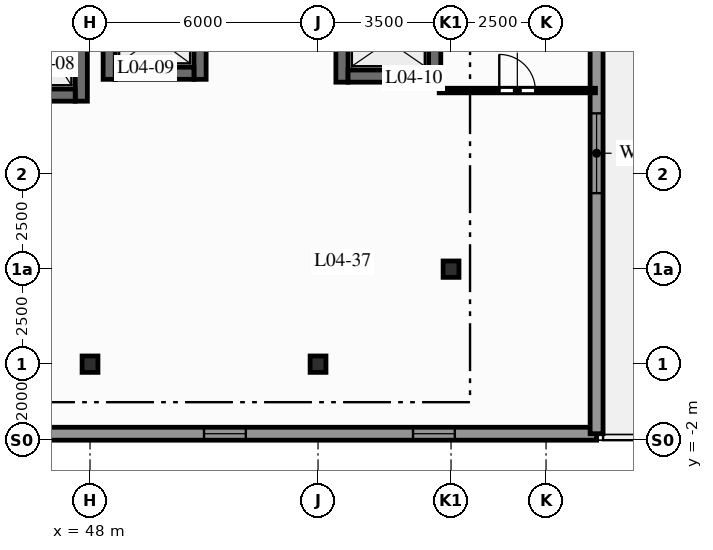
"""IFC4 building model, lengths in metres.
Left out: names, types, materials, properties, quantities, classifications, styles, units other than length and angle.
Written with IfcOpenShell. Run it as: python <this file> out.ifc"""

import sys

from ifc_helpers import new_model, si_unit, direction, frame, frame_2d, origin, origin_2d, place, context, subcontext, project, spatial, rectangle, i_section, extrude, element, fill, save


model = new_model("IFC4")
c1 = context("Model", 3, precision=1e-05, world=origin(), true_north=direction((0.0, 1.0)))
c2 = subcontext(c1, "Body", "Model", "MODEL_VIEW")
j1 = project(units=[si_unit("LENGTHUNIT", "METRE"), si_unit("PLANEANGLEUNIT", "RADIAN")], contexts=[c1])
p1 = place(None, origin())
s1 = spatial("IfcSite", under=j1, at=p1, CompositionType="ELEMENT")
p2 = place(p1, origin())
s2 = spatial("IfcBuilding", under=s1, at=p2, CompositionType="ELEMENT")
p3 = place(p2, frame((0.0, 0.0, 18.0)))
s3 = spatial("IfcBuildingStorey", under=s2, at=p3, CompositionType="ELEMENT", Elevation=18.0)
for number, where, z_axis, x_axis in (
    (1, (48.0, 0.0, 0.0), (0.0, 0.0, 1.0), (1.0, 0.0, 0.0)),
    (2, (54.0, 0.0, 0.0), (0.0, 0.0, 1.0), (1.0, 0.0, 0.0)),
    (3, (57.5, 2.5, 0.0), (0.0, 0.0, 1.0), (1.0, 0.0, 0.0)),
):
    element("IfcColumn", number, at=place(p3, frame(where, z_axis=z_axis, x_axis=x_axis)), inside=s3, PredefinedType="COLUMN", context=c2, shape_type="SweptSolid", body=[
        extrude(i_section(OverallWidth=0.417, OverallDepth=0.431, WebThickness=0.065, FlangeThickness=0.106, FilletRadius=0.015, at=origin_2d()), origin(), (0.0, 0.0, 1.0), 4.5),
    ])
p4 = place(p3, frame((-1.33, -1.83, 0.0), z_axis=(0.0, 0.0, 1.0), x_axis=(1.0, 0.0, 0.0)))
e4 = element("IfcWall", 4, at=p4, inside=s3, PredefinedType="STANDARD", context=c2, shape_type="SweptSolid", body=[
    extrude(rectangle(XDim=62.66, YDim=0.34, at=frame_2d((31.33, 0.0))), origin(), (0.0, 0.0, 1.0), 4.22),
])
p5 = place(p4, frame((2.83, 0.0, 1.2)))
e5 = element("IfcOpeningElement", 5, at=p5, cuts=e4, PredefinedType="OPENING", context=c2, shape_type="SweptSolid", body=[
    extrude(rectangle(XDim=1.1, YDim=1.1, at=frame_2d((0.55, 0.55))), frame((0.0, 0.18, 0.0), z_axis=(0.0, -1.0, 0.0), x_axis=(1.0, 0.0, 0.0)), (0.0, 0.0, 1.0), 0.36),
])
p6 = place(p4, frame((8.33, 0.0, 1.2)))
e6 = element("IfcOpeningElement", 6, at=p6, cuts=e4, PredefinedType="OPENING", context=c2, shape_type="SweptSolid", body=[
    extrude(rectangle(XDim=1.1, YDim=1.1, at=frame_2d((0.55, 0.55))), frame((0.0, 0.18, 0.0), z_axis=(0.0, -1.0, 0.0), x_axis=(1.0, 0.0, 0.0)), (0.0, 0.0, 1.0), 0.36),
])
p7 = place(p4, frame((52.33, 0.0, 1.2)))
e7 = element("IfcOpeningElement", 7, at=p7, cuts=e4, PredefinedType="OPENING", context=c2, shape_type="SweptSolid", body=[
    extrude(rectangle(XDim=1.1, YDim=1.1, at=frame_2d((0.55, 0.55))), frame((0.0, 0.18, 0.0), z_axis=(0.0, -1.0, 0.0), x_axis=(1.0, 0.0, 0.0)), (0.0, 0.0, 1.0), 0.36),
])
p8 = place(p4, frame((57.83, 0.0, 1.2)))
e8 = element("IfcOpeningElement", 8, at=p8, cuts=e4, PredefinedType="OPENING", context=c2, shape_type="SweptSolid", body=[
    extrude(rectangle(XDim=1.1, YDim=1.1, at=frame_2d((0.55, 0.55))), frame((0.0, 0.18, 0.0), z_axis=(0.0, -1.0, 0.0), x_axis=(1.0, 0.0, 0.0)), (0.0, 0.0, 1.0), 0.36),
])
p9 = place(p3, frame((61.33, -1.83, 0.0), z_axis=(0.0, 0.0, 1.0), x_axis=(0.0, 1.0, 0.0)))
e9 = element("IfcWall", 9, at=p9, inside=s3, PredefinedType="STANDARD", context=c2, shape_type="SweptSolid", body=[
    extrude(rectangle(XDim=36.43, YDim=0.34, at=frame_2d((18.215, 0.0))), origin(), (0.0, 0.0, 1.0), 4.22),
])
p10 = place(p9, frame((6.33, 0.0, 0.9)))
e10 = element("IfcOpeningElement", 10, at=p10, cuts=e9, PredefinedType="OPENING", context=c2, shape_type="SweptSolid", body=[
    extrude(rectangle(XDim=2.1, YDim=2.05, at=frame_2d((1.05, 1.025))), frame((0.0, 0.18, 0.0), z_axis=(0.0, -1.0, 0.0), x_axis=(1.0, 0.0, 0.0)), (0.0, 0.0, 1.0), 0.36),
])
p11 = place(p9, frame((15.33, 0.0, 0.9)))
e11 = element("IfcOpeningElement", 11, at=p11, cuts=e9, PredefinedType="OPENING", context=c2, shape_type="SweptSolid", body=[
    extrude(rectangle(XDim=2.1, YDim=2.05, at=frame_2d((1.05, 1.025))), frame((0.0, 0.18, 0.0), z_axis=(0.0, -1.0, 0.0), x_axis=(1.0, 0.0, 0.0)), (0.0, 0.0, 1.0), 0.36),
])
p12 = place(p9, frame((28.63, 0.0, 0.9)))
e12 = element("IfcOpeningElement", 12, at=p12, cuts=e9, PredefinedType="OPENING", context=c2, shape_type="SweptSolid", body=[
    extrude(rectangle(XDim=2.1, YDim=2.05, at=frame_2d((1.05, 1.025))), frame((0.0, 0.18, 0.0), z_axis=(0.0, -1.0, 0.0), x_axis=(1.0, 0.0, 0.0)), (0.0, 0.0, 1.0), 0.36),
])
p13 = place(p9, frame((20.33, 0.0, 0.0)))
e13 = element("IfcOpeningElement", 13, at=p13, cuts=e9, PredefinedType="OPENING", context=c2, shape_type="SweptSolid", body=[
    extrude(rectangle(XDim=1.7, YDim=2.3, at=frame_2d((0.85, 1.15))), frame((0.0, 0.18, 0.0), z_axis=(0.0, -1.0, 0.0), x_axis=(1.0, 0.0, 0.0)), (0.0, 0.0, 1.0), 0.36),
])
p14 = place(p3, frame((47.77, 6.92, 0.0), z_axis=(0.0, 0.0, 1.0), x_axis=(0.0, 1.0, 0.0)))
e14 = element("IfcWall", 14, at=p14, inside=s3, PredefinedType="SHEAR", context=c2, shape_type="SweptSolid", body=[
    extrude(rectangle(XDim=2.86, YDim=0.32, at=frame_2d((1.43, 0.0))), origin(), (0.0, 0.0, 1.0), 4.22),
])
p15 = place(p3, frame((46.09, 7.08, 0.0), z_axis=(0.0, 0.0, 1.0), x_axis=(1.0, 0.0, 0.0)))
e15 = element("IfcWall", 15, at=p15, inside=s3, PredefinedType="SHEAR", context=c2, shape_type="SweptSolid", body=[
    extrude(rectangle(XDim=1.52, YDim=0.32, at=frame_2d((0.76, 0.0))), origin(), (0.0, 0.0, 1.0), 4.22),
])
for number, where, z_axis, x_axis in (
    (16, (48.505, 7.495, 0.0), (0.0, 0.0, 1.0), (0.0, 1.0, 0.0)),
    (17, (50.895, 7.495, 0.0), (0.0, 0.0, 1.0), (0.0, 1.0, 0.0)),
):
    element("IfcWall", number, at=place(p3, frame(where, z_axis=z_axis, x_axis=x_axis)), inside=s3, PredefinedType="SHEAR", context=c2, shape_type="SweptSolid", body=[
        extrude(rectangle(XDim=2.21, YDim=0.32, at=frame_2d((1.105, 0.0))), origin(), (0.0, 0.0, 1.0), 4.22),
    ])
p16 = place(p3, frame((48.665, 7.655, 0.0), z_axis=(0.0, 0.0, 1.0), x_axis=(1.0, 0.0, 0.0)))
e18 = element("IfcWall", 18, at=p16, inside=s3, PredefinedType="SHEAR", context=c2, shape_type="SweptSolid", body=[
    extrude(rectangle(XDim=2.07, YDim=0.32, at=frame_2d((1.035, 0.0))), origin(), (0.0, 0.0, 1.0), 4.22),
])
for number, where, z_axis, x_axis in (
    (19, (54.63, 7.42, 0.0), (0.0, 0.0, 1.0), (0.0, 1.0, 0.0)),
    (20, (57.07, 7.42, 0.0), (0.0, 0.0, 1.0), (0.0, 1.0, 0.0)),
):
    element("IfcWall", number, at=place(p3, frame(where, z_axis=z_axis, x_axis=x_axis)), inside=s3, PredefinedType="SHEAR", context=c2, shape_type="SweptSolid", body=[
        extrude(rectangle(XDim=2.16, YDim=0.32, at=frame_2d((1.08, 0.0))), origin(), (0.0, 0.0, 1.0), 4.22),
    ])
p17 = place(p3, frame((54.79, 7.58, 0.0), z_axis=(0.0, 0.0, 1.0), x_axis=(1.0, 0.0, 0.0)))
e21 = element("IfcWall", 21, at=p17, inside=s3, PredefinedType="SHEAR", context=c2, shape_type="SweptSolid", body=[
    extrude(rectangle(XDim=2.12, YDim=0.32, at=frame_2d((1.06, 0.0))), origin(), (0.0, 0.0, 1.0), 4.22),
])
p18 = place(p3, frame((57.189, 7.2, 0.0), z_axis=(0.0, 0.0, 1.0), x_axis=(1.0, 0.0, 0.0)))
e22 = element("IfcWall", 22, at=p18, inside=s3, PredefinedType="PARTITIONING", context=c2, shape_type="SweptSolid", body=[
    extrude(rectangle(XDim=4.111, YDim=0.12, at=frame_2d((2.056, 0.0))), origin(), (0.0, 0.0, 1.0), 4.22),
])
p19 = place(p18, frame((1.581, 0.0, 0.0)))
e23 = element("IfcOpeningElement", 23, at=p19, cuts=e22, PredefinedType="OPENING", context=c2, shape_type="SweptSolid", body=[
    extrude(rectangle(XDim=0.95, YDim=2.05, at=frame_2d((0.475, 1.025))), frame((0.0, 0.07, 0.0), z_axis=(0.0, -1.0, 0.0), x_axis=(1.0, 0.0, 0.0)), (0.0, 0.0, 1.0), 0.14),
])
p20 = place(p7, origin())
e24 = element("IfcWindow", 24, at=p20, inside=s3, PartitioningType="SINGLE_PANEL", PredefinedType="WINDOW", context=c2, shape_type="SweptSolid", body=[
    extrude(rectangle(XDim=1.1, YDim=1.1, at=frame_2d((0.55, 0.55))), frame((0.0, 0.03, 0.0), z_axis=(0.0, -1.0, 0.0), x_axis=(1.0, 0.0, 0.0)), (0.0, 0.0, 1.0), 0.06),
])
fill(e7, e24)
p21 = place(p8, origin())
e25 = element("IfcWindow", 25, at=p21, inside=s3, PartitioningType="SINGLE_PANEL", PredefinedType="WINDOW", context=c2, shape_type="SweptSolid", body=[
    extrude(rectangle(XDim=1.1, YDim=1.1, at=frame_2d((0.55, 0.55))), frame((0.0, 0.03, 0.0), z_axis=(0.0, -1.0, 0.0), x_axis=(1.0, 0.0, 0.0)), (0.0, 0.0, 1.0), 0.06),
])
fill(e8, e25)
p22 = place(p10, origin())
e26 = element("IfcWindow", 26, at=p22, inside=s3, PartitioningType="SINGLE_PANEL", PredefinedType="WINDOW", context=c2, shape_type="SweptSolid", body=[
    extrude(rectangle(XDim=2.1, YDim=2.05, at=frame_2d((1.05, 1.025))), frame((0.0, 0.03, 0.0), z_axis=(0.0, -1.0, 0.0), x_axis=(1.0, 0.0, 0.0)), (0.0, 0.0, 1.0), 0.06),
])
fill(e10, e26)
p23 = place(p19, origin())
e27 = element("IfcDoor", 27, at=p23, inside=s3, OperationType="SINGLE_SWING_LEFT", PredefinedType="DOOR", context=c2, shape_type="SweptSolid", body=[
    extrude(rectangle(XDim=0.95, YDim=2.05, at=frame_2d((0.475, 1.025))), frame((0.0, 0.025, 0.0), z_axis=(0.0, -1.0, 0.0), x_axis=(1.0, 0.0, 0.0)), (0.0, 0.0, 1.0), 0.05),
])
fill(e23, e27)
save(model, sys.argv[1])
